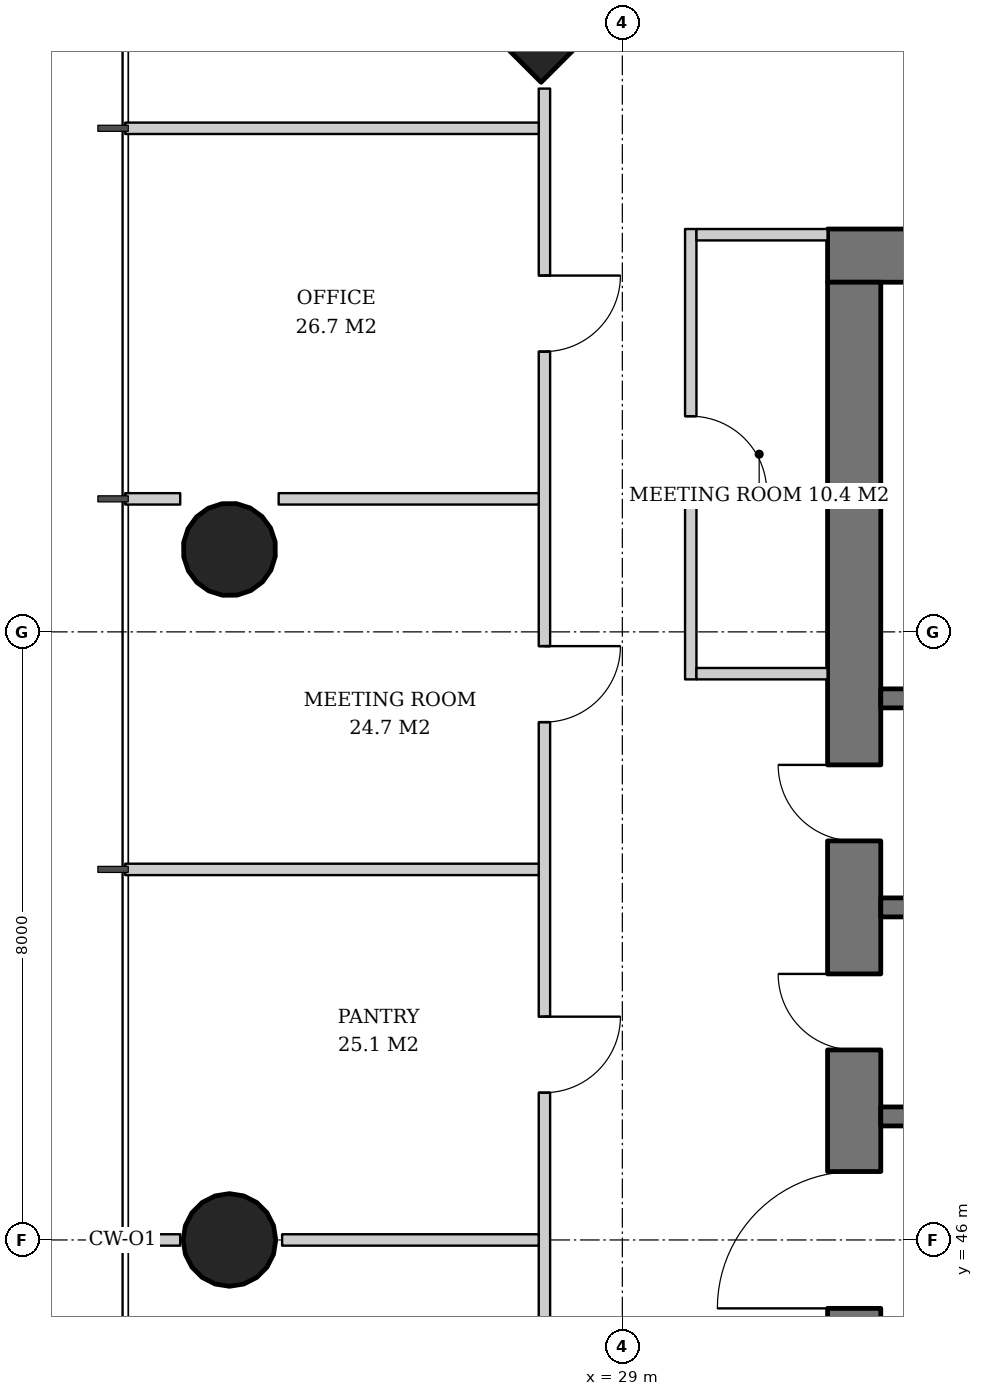
"""IFC4 building model, lengths in metres.
Left out: names, types, materials, properties, quantities, classifications, styles, units other than length and angle.
Written with IfcOpenShell. Run it as: python <this file> out.ifc"""

import sys

from ifc_helpers import new_model, si_unit, direction, frame, frame_2d, origin, origin_2d, place, context, subcontext, project, spatial, rectangle, hollow_circle, extrude, element, fill, save


model = new_model("IFC4")
c1 = context("Model", 3, precision=1e-05, world=origin(), true_north=direction((0.0, 1.0)))
c2 = subcontext(c1, "Body", "Model", "MODEL_VIEW")
j1 = project(units=[si_unit("LENGTHUNIT", "METRE"), si_unit("PLANEANGLEUNIT", "RADIAN")], contexts=[c1])
p1 = place(None, origin())
s1 = spatial("IfcSite", under=j1, at=p1, CompositionType="ELEMENT")
p2 = place(p1, origin())
s2 = spatial("IfcBuilding", under=s1, at=p2, CompositionType="ELEMENT")
p3 = place(p2, frame((0.0, 0.0, 108.4)))
s3 = spatial("IfcBuildingStorey", under=s2, at=p3, CompositionType="ELEMENT", Elevation=108.4)
p4 = place(p3, frame((27.893, 63.107, 0.0), z_axis=(0.031962158256, -0.031962158256, 0.998977898093), x_axis=(0.707106781187, 0.707106781187, 0.0)))
e1 = element("IfcColumn", 1, at=p4, inside=s3, PredefinedType="COLUMN", context=c2, shape_type="SweptSolid", body=[
    extrude(rectangle(XDim=2.6, YDim=2.6, at=origin_2d()), origin(), (0.0, 0.0, 1.0), 3.804),
])
p5 = place(p3, frame((23.793, 55.104, 0.0), z_axis=(0.031910302246, -0.015923048203, 0.999363892257), x_axis=(0.446493300058, 0.894786976326, 0.0)))
e2 = element("IfcColumn", 2, at=p5, inside=s3, PredefinedType="COLUMN", context=c2, shape_type="SweptSolid", body=[
    extrude(hollow_circle(Radius=0.61, WallThickness=0.04, at=origin_2d()), origin(), (0.0, 0.0, 1.0), 3.802),
])
p6 = place(p3, frame((23.793, 46.0, 0.0), z_axis=(0.031914348339, 0.0, 0.999490607445), x_axis=(0.0, 1.0, 0.0)))
e3 = element("IfcColumn", 3, at=p6, inside=s3, PredefinedType="COLUMN", context=c2, shape_type="SweptSolid", body=[
    extrude(hollow_circle(Radius=0.61, WallThickness=0.04, at=origin_2d()), origin(), (0.0, 0.0, 1.0), 3.802),
])
p7 = place(p3, frame((31.7, 58.95, 0.0), z_axis=(0.0, 0.0, 1.0), x_axis=(1.0, 0.0, 0.0)))
e4 = element("IfcWall", 4, at=p7, inside=s3, PredefinedType="SHEAR", context=c2, shape_type="SweptSolid", body=[
    extrude(rectangle(XDim=26.6, YDim=0.7, at=frame_2d((13.3, 0.0))), origin(), (0.0, 0.0, 1.0), 3.8),
])
p8 = place(p7, frame((17.94, 0.0, 0.0)))
e5 = element("IfcOpeningElement", 5, at=p8, cuts=e4, PredefinedType="OPENING", context=c2, shape_type="SweptSolid", body=[
    extrude(rectangle(XDim=1.0, YDim=2.1, at=frame_2d((0.5, 1.05))), frame((0.0, 0.36, 0.0), z_axis=(0.0, -1.0, 0.0), x_axis=(1.0, 0.0, 0.0)), (0.0, 0.0, 1.0), 0.72),
])
p9 = place(p7, frame((5.825, 0.0, 0.0)))
e6 = element("IfcOpeningElement", 6, at=p9, cuts=e4, PredefinedType="OPENING", context=c2, shape_type="SweptSolid", body=[
    extrude(rectangle(XDim=1.0, YDim=2.1, at=frame_2d((0.5, 1.05))), frame((0.0, 0.36, 0.0), z_axis=(0.0, -1.0, 0.0), x_axis=(1.0, 0.0, 0.0)), (0.0, 0.0, 1.0), 0.72),
])
p10 = place(p7, frame((1.85, 0.0, 0.0)))
e7 = element("IfcOpeningElement", 7, at=p10, cuts=e4, PredefinedType="OPENING", context=c2, shape_type="SweptSolid", body=[
    extrude(rectangle(XDim=1.0, YDim=2.1, at=frame_2d((0.5, 1.05))), frame((0.0, 0.36, 0.0), z_axis=(0.0, -1.0, 0.0), x_axis=(1.0, 0.0, 0.0)), (0.0, 0.0, 1.0), 0.72),
])
p11 = place(p7, frame((4.115, 0.0, 0.0)))
e8 = element("IfcOpeningElement", 8, at=p11, cuts=e4, PredefinedType="OPENING", context=c2, shape_type="SweptSolid", body=[
    extrude(rectangle(XDim=1.0, YDim=2.1, at=frame_2d((0.5, 1.05))), frame((0.0, 0.36, 0.0), z_axis=(0.0, -1.0, 0.0), x_axis=(1.0, 0.0, 0.0)), (0.0, 0.0, 1.0), 0.72),
])
p12 = place(p7, frame((11.577, 0.0, 0.0)))
e9 = element("IfcOpeningElement", 9, at=p12, cuts=e4, PredefinedType="OPENING", context=c2, shape_type="SweptSolid", body=[
    extrude(rectangle(XDim=1.0, YDim=2.1, at=frame_2d((0.5, 1.05))), frame((0.0, 0.36, 0.0), z_axis=(0.0, -1.0, 0.0), x_axis=(1.0, 0.0, 0.0)), (0.0, 0.0, 1.0), 0.72),
])
p13 = place(p7, frame((20.9, 0.0, 0.0)))
e10 = element("IfcOpeningElement", 10, at=p13, cuts=e4, PredefinedType="OPENING", context=c2, shape_type="SweptSolid", body=[
    extrude(rectangle(XDim=1.0, YDim=2.1, at=frame_2d((0.5, 1.05))), frame((0.0, 0.36, 0.0), z_axis=(0.0, -1.0, 0.0), x_axis=(1.0, 0.0, 0.0)), (0.0, 0.0, 1.0), 0.72),
])
p14 = place(p7, frame((23.75, 0.0, 0.0)))
e11 = element("IfcOpeningElement", 11, at=p14, cuts=e4, PredefinedType="OPENING", context=c2, shape_type="SweptSolid", body=[
    extrude(rectangle(XDim=1.0, YDim=2.1, at=frame_2d((0.5, 1.05))), frame((0.0, 0.36, 0.0), z_axis=(0.0, -1.0, 0.0), x_axis=(1.0, 0.0, 0.0)), (0.0, 0.0, 1.0), 0.72),
])
p15 = place(p3, frame((32.05, 33.4, 0.0), z_axis=(0.0, 0.0, 1.0), x_axis=(0.0, 1.0, 0.0)))
e12 = element("IfcWall", 12, at=p15, inside=s3, PredefinedType="SHEAR", context=c2, shape_type="SweptSolid", body=[
    extrude(rectangle(XDim=25.2, YDim=0.7, at=frame_2d((12.6, 0.0))), origin(), (0.0, 0.0, 1.0), 3.8),
])
p16 = place(p15, frame((11.7, 0.0, 0.0)))
e13 = element("IfcOpeningElement", 13, at=p16, cuts=e12, PredefinedType="OPENING", context=c2, shape_type="SweptSolid", body=[
    extrude(rectangle(XDim=1.8, YDim=2.4, at=frame_2d((0.9, 1.2))), frame((0.0, 0.36, 0.0), z_axis=(0.0, -1.0, 0.0), x_axis=(1.0, 0.0, 0.0)), (0.0, 0.0, 1.0), 0.72),
])
p17 = place(p15, frame((3.6, 0.0, 0.0)))
e14 = element("IfcOpeningElement", 14, at=p17, cuts=e12, PredefinedType="OPENING", context=c2, shape_type="SweptSolid", body=[
    extrude(rectangle(XDim=1.0, YDim=2.1, at=frame_2d((0.5, 1.05))), frame((0.0, 0.36, 0.0), z_axis=(0.0, -1.0, 0.0), x_axis=(1.0, 0.0, 0.0)), (0.0, 0.0, 1.0), 0.72),
])
p18 = place(p15, frame((6.35, 0.0, 0.0)))
e15 = element("IfcOpeningElement", 15, at=p18, cuts=e12, PredefinedType="OPENING", context=c2, shape_type="SweptSolid", body=[
    extrude(rectangle(XDim=1.0, YDim=2.1, at=frame_2d((0.5, 1.05))), frame((0.0, 0.36, 0.0), z_axis=(0.0, -1.0, 0.0), x_axis=(1.0, 0.0, 0.0)), (0.0, 0.0, 1.0), 0.72),
])
p19 = place(p15, frame((9.1, 0.0, 0.0)))
e16 = element("IfcOpeningElement", 16, at=p19, cuts=e12, PredefinedType="OPENING", context=c2, shape_type="SweptSolid", body=[
    extrude(rectangle(XDim=1.0, YDim=2.1, at=frame_2d((0.5, 1.05))), frame((0.0, 0.36, 0.0), z_axis=(0.0, -1.0, 0.0), x_axis=(1.0, 0.0, 0.0)), (0.0, 0.0, 1.0), 0.72),
])
p20 = place(p15, frame((15.1, 0.0, 0.0)))
e17 = element("IfcOpeningElement", 17, at=p20, cuts=e12, PredefinedType="OPENING", context=c2, shape_type="SweptSolid", body=[
    extrude(rectangle(XDim=1.0, YDim=2.1, at=frame_2d((0.5, 1.05))), frame((0.0, 0.36, 0.0), z_axis=(0.0, -1.0, 0.0), x_axis=(1.0, 0.0, 0.0)), (0.0, 0.0, 1.0), 0.72),
])
p21 = place(p15, frame((17.85, 0.0, 0.0)))
e18 = element("IfcOpeningElement", 18, at=p21, cuts=e12, PredefinedType="OPENING", context=c2, shape_type="SweptSolid", body=[
    extrude(rectangle(XDim=1.0, YDim=2.1, at=frame_2d((0.5, 1.05))), frame((0.0, 0.36, 0.0), z_axis=(0.0, -1.0, 0.0), x_axis=(1.0, 0.0, 0.0)), (0.0, 0.0, 1.0), 0.72),
])
for number, where, z_axis, x_axis in (
    (19, (32.4, 47.625, 0.0), (0.0, 0.0, 1.0), (1.0, 0.0, 0.0)),
    (20, (32.4, 50.375, 0.0), (0.0, 0.0, 1.0), (1.0, 0.0, 0.0)),
    (21, (32.4, 53.125, 0.0), (0.0, 0.0, 1.0), (1.0, 0.0, 0.0)),
):
    element("IfcWall", number, at=place(p3, frame(where, z_axis=z_axis, x_axis=x_axis)), inside=s3, PredefinedType="SHEAR", context=c2, shape_type="SweptSolid", body=[
        extrude(rectangle(XDim=2.7, YDim=0.25, at=frame_2d((1.35, 0.0))), origin(), (0.0, 0.0, 1.0), 3.8),
    ])
p22 = place(p3, frame((29.9, 59.3, 0.0), z_axis=(0.0, 0.0, 1.0), x_axis=(0.0, -1.0, 0.0)))
e22 = element("IfcWall", 22, at=p22, inside=s3, PredefinedType="PARTITIONING", context=c2, shape_type="SweptSolid", body=[
    extrude(rectangle(XDim=5.925, YDim=0.15, at=frame_2d((2.962, 0.0))), origin(), (0.0, 0.0, 1.0), 2.72),
])
p23 = place(p22, frame((2.462, 0.0, 0.0)))
e23 = element("IfcOpeningElement", 23, at=p23, cuts=e22, PredefinedType="OPENING", context=c2, shape_type="SweptSolid", body=[
    extrude(rectangle(XDim=1.0, YDim=2.1, at=frame_2d((0.5, 1.05))), frame((0.0, 0.085, 0.0), z_axis=(0.0, -1.0, 0.0), x_axis=(1.0, 0.0, 0.0)), (0.0, 0.0, 1.0), 0.17),
])
for number, where, z_axis, x_axis in (
    (24, (31.7, 59.225, 0.0), (0.0, 0.0, 1.0), (-1.0, 0.0, 0.0)),
    (25, (31.7, 53.45, 0.0), (0.0, 0.0, 1.0), (-1.0, 0.0, 0.0)),
):
    element("IfcWall", number, at=place(p3, frame(where, z_axis=z_axis, x_axis=x_axis)), inside=s3, PredefinedType="PARTITIONING", context=c2, shape_type="SweptSolid", body=[
        extrude(rectangle(XDim=1.725, YDim=0.15, at=frame_2d((0.862, 0.0))), origin(), (0.0, 0.0, 1.0), 3.62),
    ])
p24 = place(p3, frame((27.975, 61.147, 0.0), z_axis=(0.0, 0.0, 1.0), x_axis=(0.0, -1.0, 0.0)))
e26 = element("IfcWall", 26, at=p24, inside=s3, PredefinedType="PARTITIONING", context=c2, shape_type="SweptSolid", body=[
    extrude(rectangle(XDim=30.294, YDim=0.15, at=frame_2d((15.147, 0.0))), origin(), (0.0, 0.0, 1.0), 2.72),
])
p25 = place(p24, frame((2.46, 0.0, 0.0)))
e27 = element("IfcOpeningElement", 27, at=p25, cuts=e26, PredefinedType="OPENING", context=c2, shape_type="SweptSolid", body=[
    extrude(rectangle(XDim=1.0, YDim=2.1, at=frame_2d((0.5, 1.05))), frame((0.0, 0.085, 0.0), z_axis=(0.0, -1.0, 0.0), x_axis=(1.0, 0.0, 0.0)), (0.0, 0.0, 1.0), 0.17),
])
p26 = place(p24, frame((7.335, 0.0, 0.0)))
e28 = element("IfcOpeningElement", 28, at=p26, cuts=e26, PredefinedType="OPENING", context=c2, shape_type="SweptSolid", body=[
    extrude(rectangle(XDim=1.0, YDim=2.1, at=frame_2d((0.5, 1.05))), frame((0.0, 0.085, 0.0), z_axis=(0.0, -1.0, 0.0), x_axis=(1.0, 0.0, 0.0)), (0.0, 0.0, 1.0), 0.17),
])
p27 = place(p24, frame((12.21, 0.0, 0.0)))
e29 = element("IfcOpeningElement", 29, at=p27, cuts=e26, PredefinedType="OPENING", context=c2, shape_type="SweptSolid", body=[
    extrude(rectangle(XDim=1.0, YDim=2.1, at=frame_2d((0.5, 1.05))), frame((0.0, 0.085, 0.0), z_axis=(0.0, -1.0, 0.0), x_axis=(1.0, 0.0, 0.0)), (0.0, 0.0, 1.0), 0.17),
])
p28 = place(p24, frame((17.185, 0.0, 0.0)))
e30 = element("IfcOpeningElement", 30, at=p28, cuts=e26, PredefinedType="OPENING", context=c2, shape_type="SweptSolid", body=[
    extrude(rectangle(XDim=0.8, YDim=2.1, at=frame_2d((0.4, 1.05))), frame((0.0, 0.085, 0.0), z_axis=(0.0, -1.0, 0.0), x_axis=(1.0, 0.0, 0.0)), (0.0, 0.0, 1.0), 0.17),
])
p29 = place(p24, frame((21.96, 0.0, 0.0)))
e31 = element("IfcOpeningElement", 31, at=p29, cuts=e26, PredefinedType="OPENING", context=c2, shape_type="SweptSolid", body=[
    extrude(rectangle(XDim=1.0, YDim=2.1, at=frame_2d((0.5, 1.05))), frame((0.0, 0.085, 0.0), z_axis=(0.0, -1.0, 0.0), x_axis=(1.0, 0.0, 0.0)), (0.0, 0.0, 1.0), 0.17),
])
p30 = place(p24, frame((26.935, 0.0, 0.0)))
e32 = element("IfcOpeningElement", 32, at=p30, cuts=e26, PredefinedType="OPENING", context=c2, shape_type="SweptSolid", body=[
    extrude(rectangle(XDim=0.8, YDim=2.1, at=frame_2d((0.4, 1.05))), frame((0.0, 0.085, 0.0), z_axis=(0.0, -1.0, 0.0), x_axis=(1.0, 0.0, 0.0)), (0.0, 0.0, 1.0), 0.17),
])
p31 = place(p3, frame((27.9, 60.625, 0.0), z_axis=(0.0, 0.0, 1.0), x_axis=(-1.0, 0.0, 0.0)))
e33 = element("IfcWall", 33, at=p31, inside=s3, PredefinedType="PARTITIONING", context=c2, shape_type="SweptSolid", body=[
    extrude(rectangle(XDim=5.44, YDim=0.15, at=frame_2d((2.72, 0.0))), origin(), (0.0, 0.0, 1.0), 2.82),
])
p32 = place(p3, frame((27.9, 55.75, 0.0), z_axis=(0.0, 0.0, 1.0), x_axis=(-1.0, 0.0, 0.0)))
e34 = element("IfcWall", 34, at=p32, inside=s3, PredefinedType="PARTITIONING", context=c2, shape_type="SweptSolid", body=[
    extrude(rectangle(XDim=3.421, YDim=0.15, at=frame_2d((1.711, 0.0))), origin(), (0.0, 0.0, 1.0), 3.62),
])
p33 = place(p3, frame((23.183, 55.75, 0.0), z_axis=(0.0, 0.0, 1.0), x_axis=(-1.0, 0.0, 0.0)))
e35 = element("IfcWall", 35, at=p33, inside=s3, PredefinedType="PARTITIONING", context=c2, shape_type="SweptSolid", body=[
    extrude(rectangle(XDim=0.723, YDim=0.15, at=frame_2d((0.362, 0.0))), origin(), (0.0, 0.0, 1.0), 3.62),
])
p34 = place(p3, frame((27.9, 50.875, 0.0), z_axis=(0.0, 0.0, 1.0), x_axis=(-1.0, 0.0, 0.0)))
e36 = element("IfcWall", 36, at=p34, inside=s3, PredefinedType="PARTITIONING", context=c2, shape_type="SweptSolid", body=[
    extrude(rectangle(XDim=5.44, YDim=0.15, at=frame_2d((2.72, 0.0))), origin(), (0.0, 0.0, 1.0), 2.82),
])
p35 = place(p3, frame((27.9, 46.0, 0.0), z_axis=(0.0, 0.0, 1.0), x_axis=(-1.0, 0.0, 0.0)))
e37 = element("IfcWall", 37, at=p35, inside=s3, PredefinedType="PARTITIONING", context=c2, shape_type="SweptSolid", body=[
    extrude(rectangle(XDim=3.376, YDim=0.15, at=frame_2d((1.688, 0.0))), origin(), (0.0, 0.0, 1.0), 2.858),
])
p36 = place(p3, frame((23.183, 46.0, 0.0), z_axis=(0.0, 0.0, 1.0), x_axis=(-1.0, 0.0, 0.0)))
e38 = element("IfcWall", 38, at=p36, inside=s3, PredefinedType="PARTITIONING", context=c2, shape_type="SweptSolid", body=[
    extrude(rectangle(XDim=0.723, YDim=0.15, at=frame_2d((0.362, 0.0))), origin(), (0.0, 0.0, 1.0), 3.62),
])
p37 = place(p16, origin())
e39 = element("IfcDoor", 39, at=p37, inside=s3, OperationType="DOUBLE_DOOR_SINGLE_SWING", PredefinedType="DOOR", context=c2, shape_type="SweptSolid", body=[
    extrude(rectangle(XDim=1.8, YDim=2.4, at=frame_2d((0.9, 1.2))), frame((0.0, 0.025, 0.0), z_axis=(0.0, -1.0, 0.0), x_axis=(1.0, 0.0, 0.0)), (0.0, 0.0, 1.0), 0.05),
])
fill(e13, e39)
p38 = place(p20, origin())
e40 = element("IfcDoor", 40, at=p38, inside=s3, OperationType="SINGLE_SWING_RIGHT", PredefinedType="DOOR", context=c2, shape_type="SweptSolid", body=[
    extrude(rectangle(XDim=1.0, YDim=2.1, at=frame_2d((0.5, 1.05))), frame((0.0, -0.29, 0.0), z_axis=(0.0, -1.0, 0.0), x_axis=(1.0, 0.0, 0.0)), (0.0, 0.0, 1.0), 0.05),
])
fill(e17, e40)
p39 = place(p21, origin())
e41 = element("IfcDoor", 41, at=p39, inside=s3, OperationType="SINGLE_SWING_RIGHT", PredefinedType="DOOR", context=c2, shape_type="SweptSolid", body=[
    extrude(rectangle(XDim=1.0, YDim=2.1, at=frame_2d((0.5, 1.05))), frame((0.0, -0.29, 0.0), z_axis=(0.0, -1.0, 0.0), x_axis=(1.0, 0.0, 0.0)), (0.0, 0.0, 1.0), 0.05),
])
fill(e18, e41)
p40 = place(p23, origin())
e42 = element("IfcDoor", 42, at=p40, inside=s3, OperationType="SINGLE_SWING_RIGHT", PredefinedType="DOOR", context=c2, shape_type="SweptSolid", body=[
    extrude(rectangle(XDim=1.0, YDim=2.1, at=frame_2d((0.5, 1.05))), frame((0.0, 0.025, 0.0), z_axis=(0.0, -1.0, 0.0), x_axis=(1.0, 0.0, 0.0)), (0.0, 0.0, 1.0), 0.05),
])
fill(e23, e42)
p41 = place(p25, origin())
e43 = element("IfcDoor", 43, at=p41, inside=s3, OperationType="SINGLE_SWING_LEFT", PredefinedType="DOOR", context=c2, shape_type="SweptSolid", body=[
    extrude(rectangle(XDim=1.0, YDim=2.1, at=frame_2d((0.5, 1.05))), frame((0.0, 0.025, 0.0), z_axis=(0.0, -1.0, 0.0), x_axis=(1.0, 0.0, 0.0)), (0.0, 0.0, 1.0), 0.05),
])
fill(e27, e43)
p42 = place(p26, origin())
e44 = element("IfcDoor", 44, at=p42, inside=s3, OperationType="SINGLE_SWING_LEFT", PredefinedType="DOOR", context=c2, shape_type="SweptSolid", body=[
    extrude(rectangle(XDim=1.0, YDim=2.1, at=frame_2d((0.5, 1.05))), frame((0.0, 0.025, 0.0), z_axis=(0.0, -1.0, 0.0), x_axis=(1.0, 0.0, 0.0)), (0.0, 0.0, 1.0), 0.05),
])
fill(e28, e44)
p43 = place(p27, origin())
e45 = element("IfcDoor", 45, at=p43, inside=s3, OperationType="SINGLE_SWING_LEFT", PredefinedType="DOOR", context=c2, shape_type="SweptSolid", body=[
    extrude(rectangle(XDim=1.0, YDim=2.1, at=frame_2d((0.5, 1.05))), frame((0.0, 0.025, 0.0), z_axis=(0.0, -1.0, 0.0), x_axis=(1.0, 0.0, 0.0)), (0.0, 0.0, 1.0), 0.05),
])
fill(e29, e45)
save(model, sys.argv[1])
